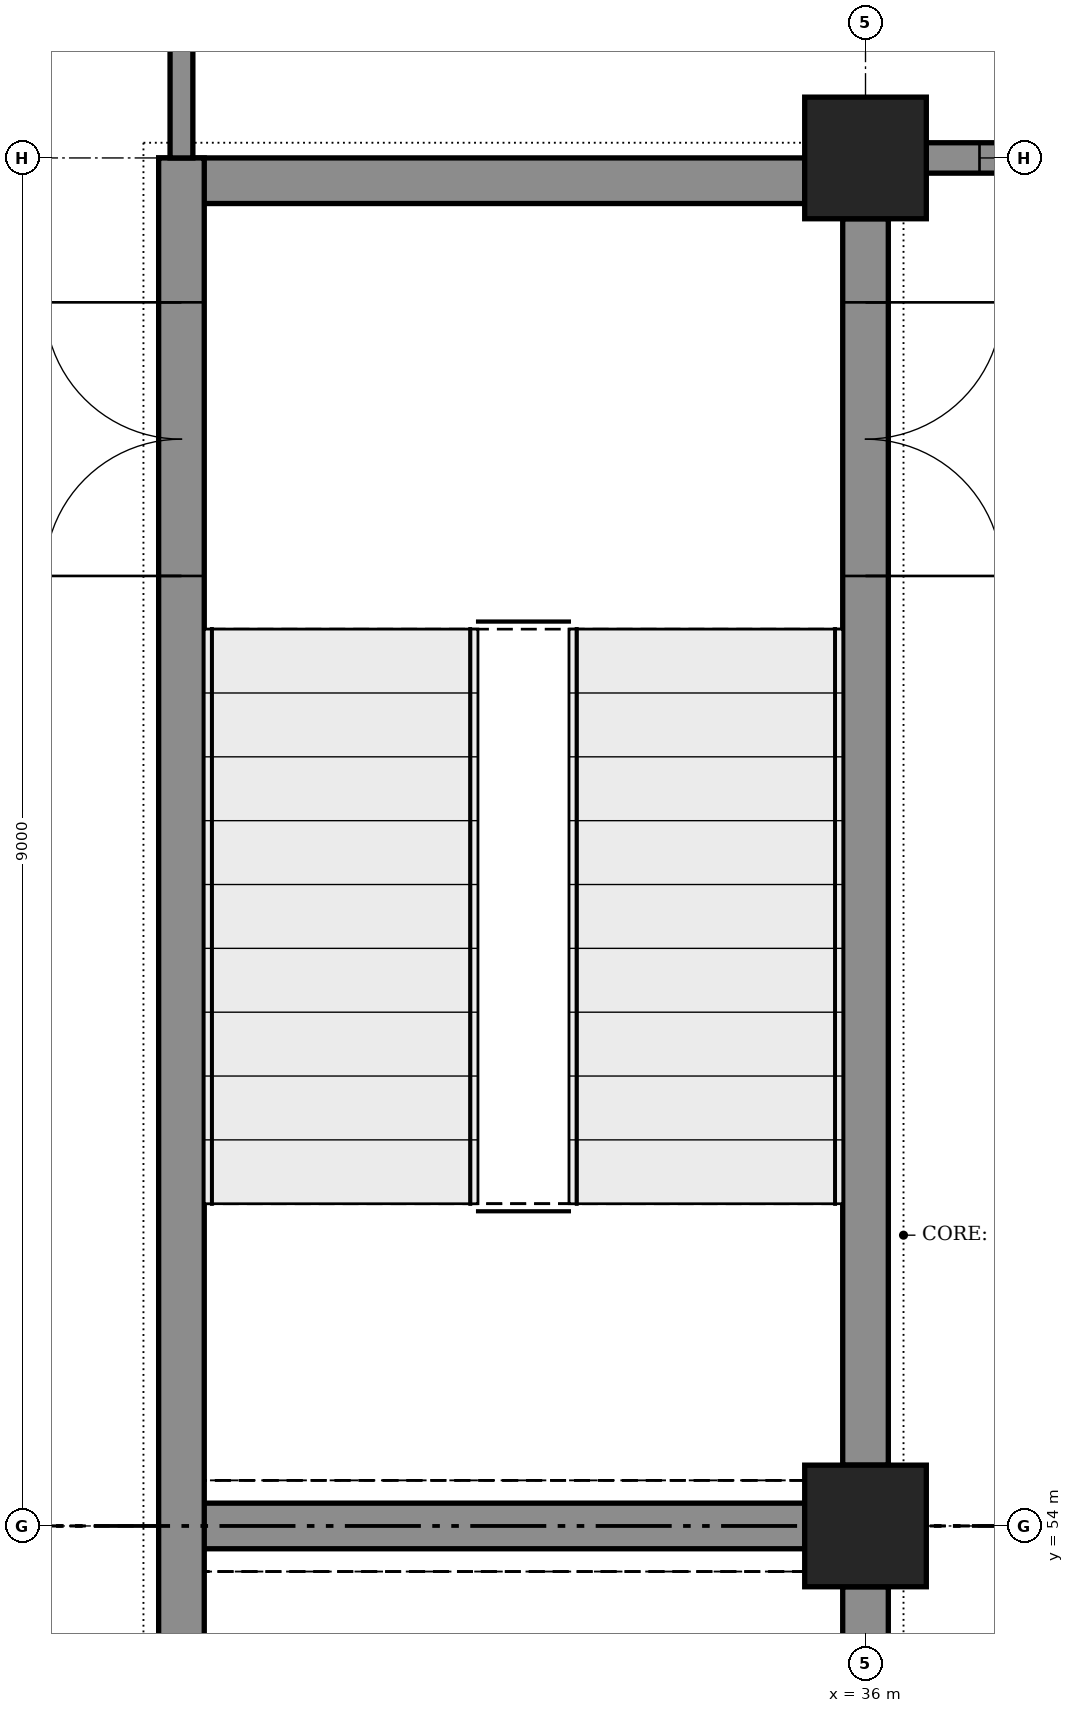
"""IFC4 building model, lengths in metres.
Left out: names, types, materials, properties, quantities, classifications, styles, units other than length and angle.
Written with IfcOpenShell. Run it as: python <this file> out.ifc"""

import sys

from ifc_helpers import new_model, si_unit, direction, frame, frame_2d, origin, origin_2d, place, context, subcontext, project, spatial, rectangle, extrude, element, fill, save


model = new_model("IFC4")
c1 = context("Model", 3, precision=1e-05, world=origin(), true_north=direction((0.0, 1.0)))
c2 = subcontext(c1, "Body", "Model", "MODEL_VIEW")
j1 = project(units=[si_unit("LENGTHUNIT", "METRE"), si_unit("PLANEANGLEUNIT", "RADIAN")], contexts=[c1])
p1 = place(None, origin())
s1 = spatial("IfcSite", under=j1, at=p1, CompositionType="ELEMENT")
p2 = place(p1, origin())
s2 = spatial("IfcBuilding", under=s1, at=p2, CompositionType="ELEMENT")
p3 = place(p2, origin())
s3 = spatial("IfcBuildingStorey", under=s2, at=p3, CompositionType="ELEMENT", Elevation=0.0)
for number, where, z_axis, x_axis in (
    (1, (36.0, 54.0, -0.3), (0.0, 0.0, 1.0), (1.0, 0.0, 0.0)),
    (2, (36.0, 63.0, -0.3), (0.0, 0.0, 1.0), (1.0, 0.0, 0.0)),
):
    element("IfcColumn", number, at=place(p3, frame(where, z_axis=z_axis, x_axis=x_axis)), inside=s3, PredefinedType="COLUMN", context=c2, shape_type="SweptSolid", body=[
        extrude(rectangle(XDim=0.8, YDim=0.8, at=origin_2d()), origin(), (0.0, 0.0, 1.0), 6.3),
    ])
p4 = place(p3, frame((36.4, 63.0, 0.0), z_axis=(0.0, 0.0, 1.0), x_axis=(1.0, 0.0, 0.0)))
e3 = element("IfcWall", 3, at=p4, inside=s3, PredefinedType="SOLIDWALL", context=c2, shape_type="SweptSolid", body=[
    extrude(rectangle(XDim=8.2, YDim=0.2, at=frame_2d((4.1, 0.0))), origin(), (0.0, 0.0, 1.0), 4.82),
])
p5 = place(p4, frame((0.35, 0.0, 0.6)))
e4 = element("IfcOpeningElement", 4, at=p5, cuts=e3, PredefinedType="OPENING", context=c2, shape_type="SweptSolid", body=[
    extrude(rectangle(XDim=1.5, YDim=2.7, at=frame_2d((0.75, 1.35))), frame((0.0, 0.11, 0.0), z_axis=(0.0, -1.0, 0.0), x_axis=(1.0, 0.0, 0.0)), (0.0, 0.0, 1.0), 0.22),
])
p6 = place(p4, frame((6.35, 0.0, 0.6)))
e5 = element("IfcOpeningElement", 5, at=p6, cuts=e3, PredefinedType="OPENING", context=c2, shape_type="SweptSolid", body=[
    extrude(rectangle(XDim=1.5, YDim=2.7, at=frame_2d((0.75, 1.35))), frame((0.0, 0.11, 0.0), z_axis=(0.0, -1.0, 0.0), x_axis=(1.0, 0.0, 0.0)), (0.0, 0.0, 1.0), 0.22),
])
p7 = place(p4, frame((3.25, 0.0, 0.0)))
e6 = element("IfcOpeningElement", 6, at=p7, cuts=e3, PredefinedType="OPENING", context=c2, shape_type="SweptSolid", body=[
    extrude(rectangle(XDim=1.8, YDim=2.4, at=frame_2d((0.9, 1.2))), frame((0.0, 0.11, 0.0), z_axis=(0.0, -1.0, 0.0), x_axis=(1.0, 0.0, 0.0)), (0.0, 0.0, 1.0), 0.22),
])
p8 = place(p3, frame((31.5, 45.0, 0.0), z_axis=(0.0, 0.0, 1.0), x_axis=(0.0, 1.0, 0.0)))
e7 = element("IfcWall", 7, at=p8, inside=s3, PredefinedType="SOLIDWALL", context=c2, shape_type="SweptSolid", body=[
    extrude(rectangle(XDim=18.0, YDim=0.3, at=frame_2d((9.0, 0.0))), origin(), (0.0, 0.0, 1.0), 5.72),
])
p9 = place(p8, frame((0.85, 0.0, 0.0)))
e8 = element("IfcOpeningElement", 8, at=p9, cuts=e7, PredefinedType="OPENING", context=c2, shape_type="SweptSolid", body=[
    extrude(rectangle(XDim=1.8, YDim=2.4, at=frame_2d((0.9, 1.2))), frame((0.0, 0.16, 0.0), z_axis=(0.0, -1.0, 0.0), x_axis=(1.0, 0.0, 0.0)), (0.0, 0.0, 1.0), 0.32),
])
p10 = place(p8, frame((15.25, 0.0, 0.0)))
e9 = element("IfcOpeningElement", 9, at=p10, cuts=e7, PredefinedType="OPENING", context=c2, shape_type="SweptSolid", body=[
    extrude(rectangle(XDim=1.8, YDim=2.4, at=frame_2d((0.9, 1.2))), frame((0.0, 0.16, 0.0), z_axis=(0.0, -1.0, 0.0), x_axis=(1.0, 0.0, 0.0)), (0.0, 0.0, 1.0), 0.32),
])
p11 = place(p3, frame((36.0, 45.4, 0.0), z_axis=(0.0, 0.0, 1.0), x_axis=(0.0, 1.0, 0.0)))
e10 = element("IfcWall", 10, at=p11, inside=s3, PredefinedType="SOLIDWALL", context=c2, shape_type="SweptSolid", body=[
    extrude(rectangle(XDim=8.2, YDim=0.3, at=frame_2d((4.1, 0.0))), origin(), (0.0, 0.0, 1.0), 5.72),
])
p12 = place(p11, frame((0.45, 0.0, 0.0)))
e11 = element("IfcOpeningElement", 11, at=p12, cuts=e10, PredefinedType="OPENING", context=c2, shape_type="SweptSolid", body=[
    extrude(rectangle(XDim=1.8, YDim=2.4, at=frame_2d((0.9, 1.2))), frame((0.0, 0.16, 0.0), z_axis=(0.0, -1.0, 0.0), x_axis=(1.0, 0.0, 0.0)), (0.0, 0.0, 1.0), 0.32),
])
p13 = place(p3, frame((36.0, 54.4, 0.0), z_axis=(0.0, 0.0, 1.0), x_axis=(0.0, 1.0, 0.0)))
e12 = element("IfcWall", 12, at=p13, inside=s3, PredefinedType="SOLIDWALL", context=c2, shape_type="SweptSolid", body=[
    extrude(rectangle(XDim=8.2, YDim=0.3, at=frame_2d((4.1, 0.0))), origin(), (0.0, 0.0, 1.0), 5.72),
])
p14 = place(p13, frame((5.85, 0.0, 0.0)))
e13 = element("IfcOpeningElement", 13, at=p14, cuts=e12, PredefinedType="OPENING", context=c2, shape_type="SweptSolid", body=[
    extrude(rectangle(XDim=1.8, YDim=2.4, at=frame_2d((0.9, 1.2))), frame((0.0, 0.16, 0.0), z_axis=(0.0, -1.0, 0.0), x_axis=(1.0, 0.0, 0.0)), (0.0, 0.0, 1.0), 0.32),
])
for number, where, z_axis, x_axis in (
    (14, (31.35, 54.0, 0.0), (0.0, 0.0, 1.0), (1.0, 0.0, 0.0)),
    (15, (31.35, 62.85, 0.0), (0.0, 0.0, 1.0), (1.0, 0.0, 0.0)),
):
    element("IfcWall", number, at=place(p3, frame(where, z_axis=z_axis, x_axis=x_axis)), inside=s3, PredefinedType="SOLIDWALL", context=c2, shape_type="SweptSolid", body=[
        extrude(rectangle(XDim=4.25, YDim=0.3, at=frame_2d((2.125, 0.0))), origin(), (0.0, 0.0, 1.0), 5.72),
    ])
p15 = place(p3, frame((31.5, 63.0, 0.0), z_axis=(0.0, 0.0, 1.0), x_axis=(0.0, 1.0, 0.0)))
e16 = element("IfcWall", 16, at=p15, inside=s3, PredefinedType="PARTITIONING", context=c2, shape_type="SweptSolid", body=[
    extrude(rectangle(XDim=36.0, YDim=0.15, at=frame_2d((18.0, 0.0))), origin(), (0.0, 0.0, 1.0), 5.72),
])
p16 = place(p15, frame((8.1, 0.0, 0.0)))
e17 = element("IfcOpeningElement", 17, at=p16, cuts=e16, PredefinedType="OPENING", context=c2, shape_type="SweptSolid", body=[
    extrude(rectangle(XDim=1.8, YDim=2.4, at=frame_2d((0.9, 1.2))), frame((0.0, 0.085, 0.0), z_axis=(0.0, -1.0, 0.0), x_axis=(1.0, 0.0, 0.0)), (0.0, 0.0, 1.0), 0.17),
])
p17 = place(p15, frame((26.1, 0.0, 0.0)))
e18 = element("IfcOpeningElement", 18, at=p17, cuts=e16, PredefinedType="OPENING", context=c2, shape_type="SweptSolid", body=[
    extrude(rectangle(XDim=1.8, YDim=2.4, at=frame_2d((0.9, 1.2))), frame((0.0, 0.085, 0.0), z_axis=(0.0, -1.0, 0.0), x_axis=(1.0, 0.0, 0.0)), (0.0, 0.0, 1.0), 0.17),
])
p18 = place(p5, origin())
e19 = element("IfcWindow", 19, at=p18, inside=s3, PartitioningType="SINGLE_PANEL", PredefinedType="WINDOW", context=c2, shape_type="SweptSolid", body=[
    extrude(rectangle(XDim=1.5, YDim=2.7, at=frame_2d((0.75, 1.35))), frame((0.0, 0.03, 0.0), z_axis=(0.0, -1.0, 0.0), x_axis=(1.0, 0.0, 0.0)), (0.0, 0.0, 1.0), 0.06),
])
fill(e4, e19)
p19 = place(p10, origin())
e20 = element("IfcDoor", 20, at=p19, inside=s3, OperationType="DOUBLE_DOOR_SINGLE_SWING", PredefinedType="DOOR", context=c2, shape_type="SweptSolid", body=[
    extrude(rectangle(XDim=1.8, YDim=2.4, at=frame_2d((0.9, 1.2))), frame((0.0, 0.025, 0.0), z_axis=(0.0, -1.0, 0.0), x_axis=(1.0, 0.0, 0.0)), (0.0, 0.0, 1.0), 0.05),
])
fill(e9, e20)
p20 = place(p14, frame((1.8, 0.0, 0.0), z_axis=(0.0, 0.0, 1.0), x_axis=(-1.0, 0.0, 0.0)))
e21 = element("IfcDoor", 21, at=p20, inside=s3, OperationType="DOUBLE_DOOR_SINGLE_SWING", PredefinedType="DOOR", context=c2, shape_type="SweptSolid", body=[
    extrude(rectangle(XDim=1.8, YDim=2.4, at=frame_2d((0.9, 1.2))), frame((0.0, 0.025, 0.0), z_axis=(0.0, -1.0, 0.0), x_axis=(1.0, 0.0, 0.0)), (0.0, 0.0, 1.0), 0.05),
])
fill(e13, e21)
save(model, sys.argv[1])
